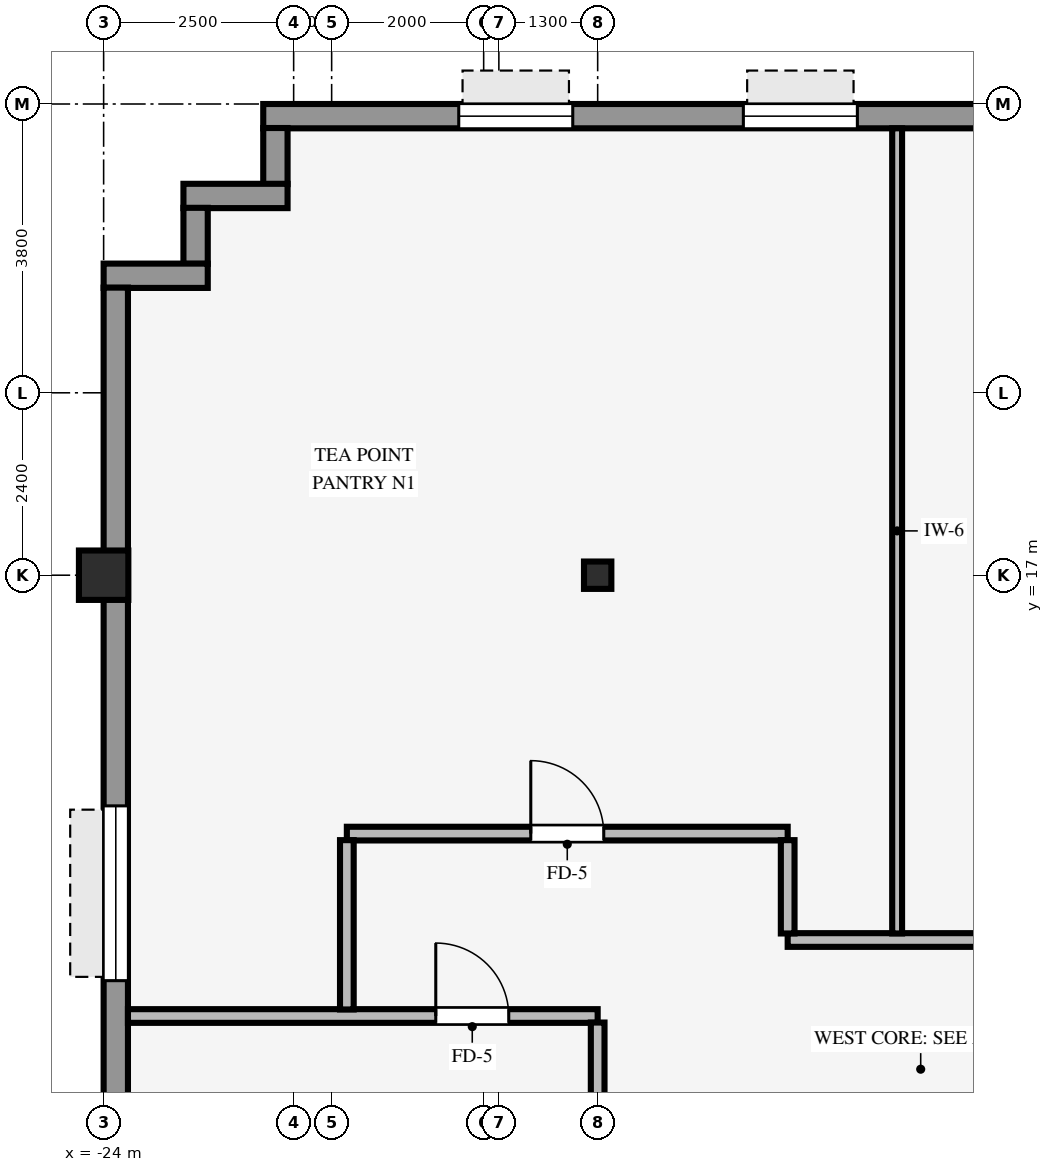
"""IFC4 building model, lengths in metres.
Left out: names, types, materials, properties, quantities, classifications, styles, units other than length and angle.
Written with IfcOpenShell. Run it as: python <this file> out.ifc"""

import sys

from ifc_helpers import new_model, si_unit, direction, frame, frame_2d, origin, origin_2d, place, context, subcontext, project, spatial, rectangle, hollow_rectangle, i_section, extrude, source, transform, mapped, element, fill, save


model = new_model("IFC4")
c1 = context("Model", 3, precision=1e-05, world=origin(), true_north=direction((0.0, 1.0)))
c2 = subcontext(c1, "Body", "Model", "MODEL_VIEW")
j1 = project(units=[si_unit("LENGTHUNIT", "METRE"), si_unit("PLANEANGLEUNIT", "RADIAN")], contexts=[c1])
p1 = place(None, origin())
s1 = spatial("IfcSite", under=j1, at=p1, CompositionType="ELEMENT")
p2 = place(p1, origin())
s2 = spatial("IfcBuilding", under=s1, at=p2, CompositionType="ELEMENT")
p3 = place(p2, frame((0.0, 0.0, 109.25)))
s3 = spatial("IfcBuildingStorey", under=s2, at=p3, CompositionType="ELEMENT", Elevation=109.25)
p4 = place(p3, frame((-24.0, 17.0, 0.0), z_axis=(0.0, 0.0, 1.0), x_axis=(1.0, 0.0, 0.0)))
e1 = element("IfcColumn", 1, at=p4, inside=s3, PredefinedType="COLUMN", context=c2, shape_type="SweptSolid", body=[
    extrude(hollow_rectangle(XDim=0.65, YDim=0.65, WallThickness=0.04, InnerFilletRadius=0.04, OuterFilletRadius=0.08, at=origin_2d()), origin(), (0.0, 0.0, 1.0), 3.37),
])
p5 = place(p3, frame((-17.5, 17.0, 0.0), z_axis=(0.0, 0.0, 1.0), x_axis=(1.0, 0.0, 0.0)))
e2 = element("IfcColumn", 2, at=p5, inside=s3, PredefinedType="COLUMN", context=c2, shape_type="SweptSolid", body=[
    extrude(i_section(OverallWidth=0.36, OverallDepth=0.36, WebThickness=0.021, FlangeThickness=0.021, FilletRadius=0.018, at=origin_2d()), origin(), (0.0, 0.0, 1.0), 3.37),
])
p6 = place(p3, frame((-21.9, 23.04, 0.0), z_axis=(0.0, 0.0, 1.0), x_axis=(1.0, 0.0, 0.0)))
e3 = element("IfcWall", 3, at=p6, inside=s3, PredefinedType="STANDARD", context=c2, shape_type="SweptSolid", body=[
    extrude(rectangle(XDim=43.8, YDim=0.32, at=frame_2d((21.9, 0.0))), origin(), (0.0, 0.0, 1.0), 2.705),
])
p7 = place(p6, frame((2.572, 0.0, 0.8)))
e4 = element("IfcOpeningElement", 4, at=p7, cuts=e3, PredefinedType="OPENING", context=c2, shape_type="SweptSolid", body=[
    extrude(rectangle(XDim=1.5, YDim=1.6, at=frame_2d((0.75, 0.8))), frame((0.0, 0.17, 0.0), z_axis=(0.0, -1.0, 0.0), x_axis=(1.0, 0.0, 0.0)), (0.0, 0.0, 1.0), 0.34),
])
p8 = place(p6, frame((6.317, 0.0, 0.8)))
e5 = element("IfcOpeningElement", 5, at=p8, cuts=e3, PredefinedType="OPENING", context=c2, shape_type="SweptSolid", body=[
    extrude(rectangle(XDim=1.5, YDim=1.6, at=frame_2d((0.75, 0.8))), frame((0.0, 0.17, 0.0), z_axis=(0.0, -1.0, 0.0), x_axis=(1.0, 0.0, 0.0)), (0.0, 0.0, 1.0), 0.34),
])
p9 = place(p6, frame((10.511, 0.0, 0.8)))
e6 = element("IfcOpeningElement", 6, at=p9, cuts=e3, PredefinedType="OPENING", context=c2, shape_type="SweptSolid", body=[
    extrude(rectangle(XDim=1.5, YDim=1.6, at=frame_2d((0.75, 0.8))), frame((0.0, 0.17, 0.0), z_axis=(0.0, -1.0, 0.0), x_axis=(1.0, 0.0, 0.0)), (0.0, 0.0, 1.0), 0.34),
])
p10 = place(p6, frame((16.956, 0.0, 0.8)))
e7 = element("IfcOpeningElement", 7, at=p10, cuts=e3, PredefinedType="OPENING", context=c2, shape_type="SweptSolid", body=[
    extrude(rectangle(XDim=1.5, YDim=1.6, at=frame_2d((0.75, 0.8))), frame((0.0, 0.17, 0.0), z_axis=(0.0, -1.0, 0.0), x_axis=(1.0, 0.0, 0.0)), (0.0, 0.0, 1.0), 0.34),
])
p11 = place(p6, frame((24.894, 0.0, 0.8)))
e8 = element("IfcOpeningElement", 8, at=p11, cuts=e3, PredefinedType="OPENING", context=c2, shape_type="SweptSolid", body=[
    extrude(rectangle(XDim=1.5, YDim=1.6, at=frame_2d((0.75, 0.8))), frame((0.0, 0.17, 0.0), z_axis=(0.0, -1.0, 0.0), x_axis=(1.0, 0.0, 0.0)), (0.0, 0.0, 1.0), 0.34),
])
p12 = place(p6, frame((35.083, 0.0, 0.8)))
e9 = element("IfcOpeningElement", 9, at=p12, cuts=e3, PredefinedType="OPENING", context=c2, shape_type="SweptSolid", body=[
    extrude(rectangle(XDim=1.5, YDim=1.6, at=frame_2d((0.75, 0.8))), frame((0.0, 0.17, 0.0), z_axis=(0.0, -1.0, 0.0), x_axis=(1.0, 0.0, 0.0)), (0.0, 0.0, 1.0), 0.34),
])
p13 = place(p6, frame((39.728, 0.0, 0.8)))
e10 = element("IfcOpeningElement", 10, at=p13, cuts=e3, PredefinedType="OPENING", context=c2, shape_type="SweptSolid", body=[
    extrude(rectangle(XDim=1.5, YDim=1.6, at=frame_2d((0.75, 0.8))), frame((0.0, 0.17, 0.0), z_axis=(0.0, -1.0, 0.0), x_axis=(1.0, 0.0, 0.0)), (0.0, 0.0, 1.0), 0.34),
])
p14 = place(p3, frame((-21.74, 22.146, 0.0), z_axis=(0.0, 0.0, 1.0), x_axis=(0.0, 1.0, 0.0)))
e11 = element("IfcWall", 11, at=p14, inside=s3, PredefinedType="STANDARD", context=c2, shape_type="SweptSolid", body=[
    extrude(rectangle(XDim=0.738, YDim=0.32, at=frame_2d((0.369, 0.0))), origin(), (0.0, 0.0, 1.0), 3.36),
])
p15 = place(p3, frame((-22.95, 21.99, 0.0), z_axis=(0.0, 0.0, 1.0), x_axis=(1.0, 0.0, 0.0)))
e12 = element("IfcWall", 12, at=p15, inside=s3, PredefinedType="STANDARD", context=c2, shape_type="SweptSolid", body=[
    extrude(rectangle(XDim=1.37, YDim=0.32, at=frame_2d((0.685, 0.0))), origin(), (0.0, 0.0, 1.0), 3.36),
])
p16 = place(p3, frame((-22.79, 21.096, 0.0), z_axis=(0.0, 0.0, 1.0), x_axis=(0.0, 1.0, 0.0)))
e13 = element("IfcWall", 13, at=p16, inside=s3, PredefinedType="STANDARD", context=c2, shape_type="SweptSolid", body=[
    extrude(rectangle(XDim=0.738, YDim=0.32, at=frame_2d((0.369, 0.0))), origin(), (0.0, 0.0, 1.0), 3.36),
])
p17 = place(p3, frame((-24.0, 20.94, 0.0), z_axis=(0.0, 0.0, 1.0), x_axis=(1.0, 0.0, 0.0)))
e14 = element("IfcWall", 14, at=p17, inside=s3, PredefinedType="STANDARD", context=c2, shape_type="SweptSolid", body=[
    extrude(rectangle(XDim=1.37, YDim=0.32, at=frame_2d((0.685, 0.0))), origin(), (0.0, 0.0, 1.0), 3.36),
])
p18 = place(p3, frame((-23.84, -20.784, 0.0), z_axis=(0.0, 0.0, 1.0), x_axis=(0.0, 1.0, 0.0)))
e15 = element("IfcWall", 15, at=p18, inside=s3, PredefinedType="STANDARD", context=c2, shape_type="SweptSolid", body=[
    extrude(rectangle(XDim=41.568, YDim=0.32, at=frame_2d((20.784, 0.0))), origin(), (0.0, 0.0, 1.0), 2.705),
])
p19 = place(p18, frame((6.819, 0.0, 0.8)))
e16 = element("IfcOpeningElement", 16, at=p19, cuts=e15, PredefinedType="OPENING", context=c2, shape_type="SweptSolid", body=[
    extrude(rectangle(XDim=2.3, YDim=1.62, at=frame_2d((1.15, 0.81))), frame((0.0, 0.17, 0.0), z_axis=(0.0, -1.0, 0.0), x_axis=(1.0, 0.0, 0.0)), (0.0, 0.0, 1.0), 0.34),
])
p20 = place(p18, frame((12.215, 0.0, 0.8)))
e17 = element("IfcOpeningElement", 17, at=p20, cuts=e15, PredefinedType="OPENING", context=c2, shape_type="SweptSolid", body=[
    extrude(rectangle(XDim=2.3, YDim=1.62, at=frame_2d((1.15, 0.81))), frame((0.0, 0.17, 0.0), z_axis=(0.0, -1.0, 0.0), x_axis=(1.0, 0.0, 0.0)), (0.0, 0.0, 1.0), 0.34),
])
p21 = place(p18, frame((17.161, 0.0, 0.8)))
e18 = element("IfcOpeningElement", 18, at=p21, cuts=e15, PredefinedType="OPENING", context=c2, shape_type="SweptSolid", body=[
    extrude(rectangle(XDim=2.3, YDim=1.62, at=frame_2d((1.15, 0.81))), frame((0.0, 0.17, 0.0), z_axis=(0.0, -1.0, 0.0), x_axis=(1.0, 0.0, 0.0)), (0.0, 0.0, 1.0), 0.34),
])
p22 = place(p18, frame((27.053, 0.0, 0.8)))
e19 = element("IfcOpeningElement", 19, at=p22, cuts=e15, PredefinedType="OPENING", context=c2, shape_type="SweptSolid", body=[
    extrude(rectangle(XDim=2.3, YDim=1.62, at=frame_2d((1.15, 0.81))), frame((0.0, 0.17, 0.0), z_axis=(0.0, -1.0, 0.0), x_axis=(1.0, 0.0, 0.0)), (0.0, 0.0, 1.0), 0.34),
])
p23 = place(p18, frame((32.449, 0.0, 0.8)))
e20 = element("IfcOpeningElement", 20, at=p23, cuts=e15, PredefinedType="OPENING", context=c2, shape_type="SweptSolid", body=[
    extrude(rectangle(XDim=2.3, YDim=1.62, at=frame_2d((1.15, 0.81))), frame((0.0, 0.17, 0.0), z_axis=(0.0, -1.0, 0.0), x_axis=(1.0, 0.0, 0.0)), (0.0, 0.0, 1.0), 0.34),
])
p24 = place(p3, frame((-23.68, 11.2, 0.0), z_axis=(0.0, 0.0, 1.0), x_axis=(1.0, 0.0, 0.0)))
e21 = element("IfcWall", 21, at=p24, inside=s3, PredefinedType="PARTITIONING", context=c2, shape_type="SweptSolid", body=[
    extrude(rectangle(XDim=6.18, YDim=0.18, at=frame_2d((3.09, 0.0))), origin(), (0.0, 0.0, 1.0), 3.36),
])
p25 = place(p24, frame((4.05, 0.0, 0.0)))
e22 = element("IfcOpeningElement", 22, at=p25, cuts=e21, PredefinedType="OPENING", context=c2, shape_type="SweptSolid", body=[
    extrude(rectangle(XDim=0.96, YDim=2.1, at=frame_2d((0.48, 1.05))), frame((0.0, 0.1, 0.0), z_axis=(0.0, -1.0, 0.0), x_axis=(1.0, 0.0, 0.0)), (0.0, 0.0, 1.0), 0.2),
])
p26 = place(p3, frame((-15.0, 12.2, 0.0), z_axis=(0.0, 0.0, 1.0), x_axis=(1.0, 0.0, 0.0)))
e23 = element("IfcWall", 23, at=p26, inside=s3, PredefinedType="PARTITIONING", context=c2, shape_type="SweptSolid", body=[
    extrude(rectangle(XDim=30.0, YDim=0.18, at=frame_2d((15.0, 0.0))), origin(), (0.0, 0.0, 1.0), 3.36),
])
p27 = place(p26, frame((4.905, 0.0, 0.0)))
e24 = element("IfcOpeningElement", 24, at=p27, cuts=e23, PredefinedType="OPENING", context=c2, shape_type="SweptSolid", body=[
    extrude(rectangle(XDim=0.96, YDim=2.1, at=frame_2d((0.48, 1.05))), frame((0.0, 0.1, 0.0), z_axis=(0.0, -1.0, 0.0), x_axis=(1.0, 0.0, 0.0)), (0.0, 0.0, 1.0), 0.2),
])
p28 = place(p26, frame((16.695, 0.0, 0.0)))
e25 = element("IfcOpeningElement", 25, at=p28, cuts=e23, PredefinedType="OPENING", context=c2, shape_type="SweptSolid", body=[
    extrude(rectangle(XDim=0.96, YDim=2.1, at=frame_2d((0.48, 1.05))), frame((0.0, 0.1, 0.0), z_axis=(0.0, -1.0, 0.0), x_axis=(1.0, 0.0, 0.0)), (0.0, 0.0, 1.0), 0.2),
])
p29 = place(p26, frame((22.15, 0.0, 0.0)))
e26 = element("IfcOpeningElement", 26, at=p29, cuts=e23, PredefinedType="OPENING", context=c2, shape_type="SweptSolid", body=[
    extrude(rectangle(XDim=0.96, YDim=2.1, at=frame_2d((0.48, 1.05))), frame((0.0, 0.1, 0.0), z_axis=(0.0, -1.0, 0.0), x_axis=(1.0, 0.0, 0.0)), (0.0, 0.0, 1.0), 0.2),
])
p30 = place(p26, frame((27.075, 0.0, 0.0)))
e27 = element("IfcOpeningElement", 27, at=p30, cuts=e23, PredefinedType="OPENING", context=c2, shape_type="SweptSolid", body=[
    extrude(rectangle(XDim=0.96, YDim=2.1, at=frame_2d((0.48, 1.05))), frame((0.0, 0.1, 0.0), z_axis=(0.0, -1.0, 0.0), x_axis=(1.0, 0.0, 0.0)), (0.0, 0.0, 1.0), 0.2),
])
p31 = place(p26, frame((10.085, 0.0, 0.0)))
e28 = element("IfcOpeningElement", 28, at=p31, cuts=e23, PredefinedType="OPENING", context=c2, shape_type="SweptSolid", body=[
    extrude(rectangle(XDim=0.96, YDim=2.1, at=frame_2d((0.48, 1.05))), frame((0.0, 0.1, 0.0), z_axis=(0.0, -1.0, 0.0), x_axis=(1.0, 0.0, 0.0)), (0.0, 0.0, 1.0), 0.2),
])
p32 = place(p3, frame((-20.8, 13.6, 0.0), z_axis=(0.0, 0.0, 1.0), x_axis=(1.0, 0.0, 0.0)))
e29 = element("IfcWall", 29, at=p32, inside=s3, PredefinedType="PARTITIONING", context=c2, shape_type="SweptSolid", body=[
    extrude(rectangle(XDim=5.8, YDim=0.18, at=frame_2d((2.9, 0.0))), origin(), (0.0, 0.0, 1.0), 2.998),
])
p33 = place(p32, frame((2.42, 0.0, 0.0)))
e30 = element("IfcOpeningElement", 30, at=p33, cuts=e29, PredefinedType="OPENING", context=c2, shape_type="SweptSolid", body=[
    extrude(rectangle(XDim=0.96, YDim=2.1, at=frame_2d((0.48, 1.05))), frame((0.0, 0.1, 0.0), z_axis=(0.0, -1.0, 0.0), x_axis=(1.0, 0.0, 0.0)), (0.0, 0.0, 1.0), 0.2),
])
p34 = place(p3, frame((-20.8, 11.286, 0.0), z_axis=(0.0, 0.0, 1.0), x_axis=(0.0, 1.0, 0.0)))
e31 = element("IfcWall", 31, at=p34, inside=s3, PredefinedType="PARTITIONING", context=c2, shape_type="SweptSolid", body=[
    extrude(rectangle(XDim=2.228, YDim=0.18, at=frame_2d((1.114, 0.0))), origin(), (0.0, 0.0, 1.0), 3.36),
])
p35 = place(p3, frame((-17.5, 10.146, 0.0), z_axis=(0.0, 0.0, 1.0), x_axis=(0.0, 1.0, 0.0)))
e32 = element("IfcWall", 32, at=p35, inside=s3, PredefinedType="PARTITIONING", context=c2, shape_type="SweptSolid", body=[
    extrude(rectangle(XDim=0.968, YDim=0.18, at=frame_2d((0.484, 0.0))), origin(), (0.0, 0.0, 1.0), 2.738),
])
p36 = place(p3, frame((-15.0, 12.286, 0.0), z_axis=(0.0, 0.0, 1.0), x_axis=(0.0, 1.0, 0.0)))
e33 = element("IfcWall", 33, at=p36, inside=s3, PredefinedType="PARTITIONING", context=c2, shape_type="SweptSolid", body=[
    extrude(rectangle(XDim=1.228, YDim=0.18, at=frame_2d((0.614, 0.0))), origin(), (0.0, 0.0, 1.0), 3.36),
])
p37 = place(p3, frame((-13.56, 12.286, 0.0), z_axis=(0.0, 0.0, 1.0), x_axis=(0.0, 1.0, 0.0)))
e34 = element("IfcWall", 34, at=p37, inside=s3, PredefinedType="PARTITIONING", context=c2, shape_type="SweptSolid", body=[
    extrude(rectangle(XDim=10.594, YDim=0.13, at=frame_2d((5.297, 0.0))), origin(), (0.0, 0.0, 1.0), 3.36),
])
m1 = source(origin(), c2, "Body", "SweptSolid", [
    extrude(rectangle(XDim=1.5, YDim=1.6, at=frame_2d((0.75, 0.8))), frame((0.0, 0.03, 0.0), z_axis=(0.0, -1.0, 0.0), x_axis=(1.0, 0.0, 0.0)), (0.0, 0.0, 1.0), 0.06),
])
p38 = place(p7, origin())
e35 = element("IfcWindow", 35, at=p38, inside=s3, PartitioningType="SINGLE_PANEL", PredefinedType="WINDOW", context=c2, shape_type="MappedRepresentation", body=[
    mapped(m1, transform((0.0, 0.0, 0.0), scale=1.0)),
])
fill(e4, e35)
p39 = place(p8, origin())
e36 = element("IfcWindow", 36, at=p39, inside=s3, PartitioningType="SINGLE_PANEL", PredefinedType="WINDOW", context=c2, shape_type="MappedRepresentation", body=[
    mapped(m1, transform((0.0, 0.0, 0.0), scale=1.0)),
])
fill(e5, e36)
m2 = source(origin(), c2, "Body", "SweptSolid", [
    extrude(rectangle(XDim=2.3, YDim=1.62, at=frame_2d((1.15, 0.81))), frame((0.0, 0.03, 0.0), z_axis=(0.0, -1.0, 0.0), x_axis=(1.0, 0.0, 0.0)), (0.0, 0.0, 1.0), 0.06),
])
p40 = place(p23, origin())
e37 = element("IfcWindow", 37, at=p40, inside=s3, PartitioningType="SINGLE_PANEL", PredefinedType="WINDOW", context=c2, shape_type="MappedRepresentation", body=[
    mapped(m2, transform((0.0, 0.0, 0.0), scale=1.0)),
])
fill(e20, e37)
m3 = source(origin(), c2, "Body", "SweptSolid", [
    extrude(rectangle(XDim=0.96, YDim=2.1, at=frame_2d((0.48, 1.05))), frame((0.0, 0.025, 0.0), z_axis=(0.0, -1.0, 0.0), x_axis=(1.0, 0.0, 0.0)), (0.0, 0.0, 1.0), 0.05),
])
p41 = place(p33, origin())
e38 = element("IfcDoor", 38, at=p41, inside=s3, OperationType="SINGLE_SWING_LEFT", PredefinedType="DOOR", context=c2, shape_type="MappedRepresentation", body=[
    mapped(m3, transform((0.0, 0.0, 0.0), scale=1.0)),
])
fill(e30, e38)
p42 = place(p25, origin())
e39 = element("IfcDoor", 39, at=p42, inside=s3, OperationType="SINGLE_SWING_LEFT", PredefinedType="DOOR", context=c2, shape_type="MappedRepresentation", body=[
    mapped(m3, transform((0.0, 0.0, 0.0), scale=1.0)),
])
fill(e22, e39)
save(model, sys.argv[1])
